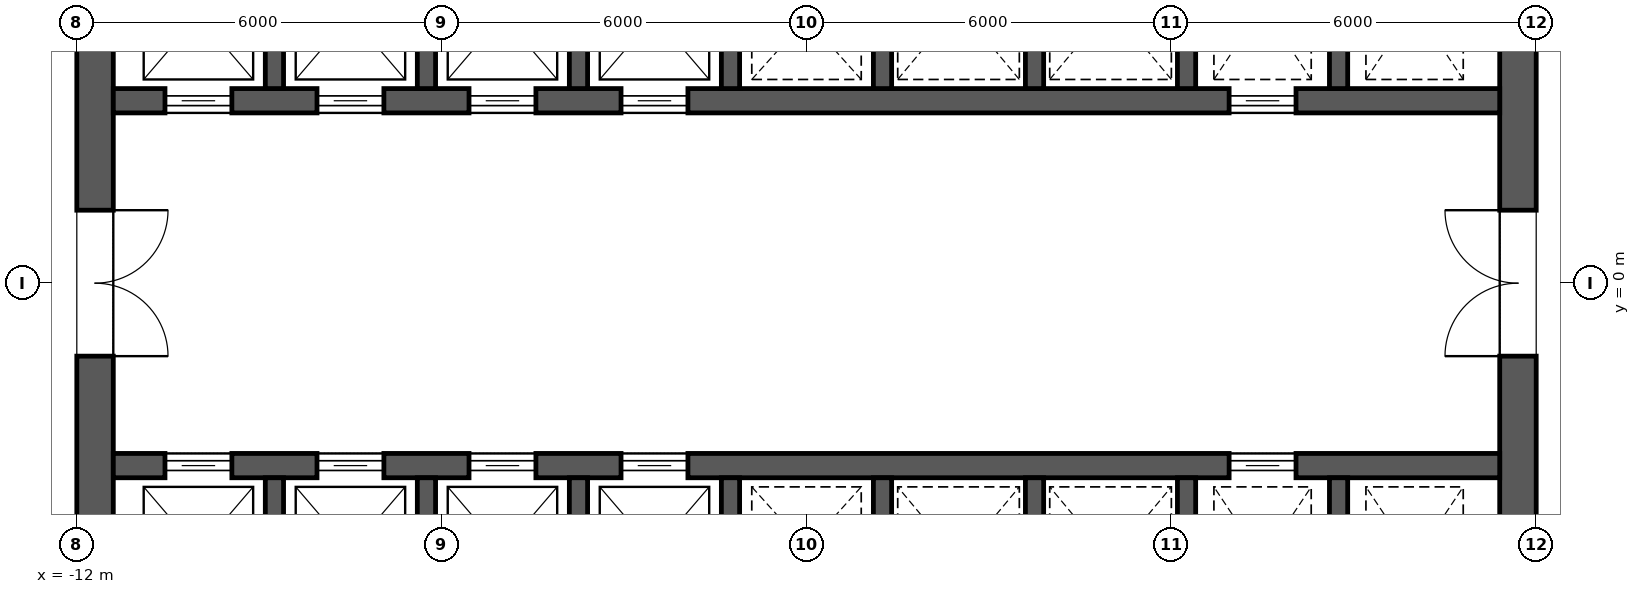
"""IFC4 building model, lengths in metres.
Left out: names, types, materials, properties, quantities, classifications, styles, units other than length and angle.
Written with IfcOpenShell. Run it as: python <this file> out.ifc"""

import sys

from ifc_helpers import new_model, si_unit, direction, frame, frame_2d, origin, place, context, subcontext, project, spatial, rectangle, extrude, element, fill, save


model = new_model("IFC4")
c1 = context("Model", 3, precision=1e-05, world=origin(), true_north=direction((0.0, 1.0)))
c2 = subcontext(c1, "Body", "Model", "MODEL_VIEW")
j1 = project(units=[si_unit("LENGTHUNIT", "METRE"), si_unit("PLANEANGLEUNIT", "RADIAN")], contexts=[c1])
p1 = place(None, origin())
s1 = spatial("IfcSite", under=j1, at=p1, CompositionType="ELEMENT")
p2 = place(p1, origin())
s2 = spatial("IfcBuilding", under=s1, at=p2, CompositionType="ELEMENT")
p3 = place(p2, frame((0.0, 0.0, 117.1)))
s3 = spatial("IfcBuildingStorey", under=s2, at=p3, CompositionType="ELEMENT", Elevation=117.1)
p4 = place(p3, frame((11.7, -11.4, 0.0), z_axis=(0.0, 0.0, 1.0), x_axis=(0.0, 1.0, 0.0)))
e1 = element("IfcWall", 1, at=p4, inside=s3, PredefinedType="SHEAR", context=c2, shape_type="SweptSolid", body=[
    extrude(rectangle(XDim=22.8, YDim=0.6, at=frame_2d((11.4, 0.0))), origin(), (0.0, 0.0, 1.0), 4.2),
])
p5 = place(p4, frame((10.2, 0.0, 0.0)))
e2 = element("IfcOpeningElement", 2, at=p5, cuts=e1, PredefinedType="OPENING", context=c2, shape_type="SweptSolid", body=[
    extrude(rectangle(XDim=2.4, YDim=2.1, at=frame_2d((1.2, 1.05))), frame((0.0, 0.312, 0.0), z_axis=(0.0, -1.0, 0.0), x_axis=(1.0, 0.0, 0.0)), (0.0, 0.0, 1.0), 0.624),
])
p6 = place(p4, frame((19.5, 0.0, 0.0)))
e3 = element("IfcOpeningElement", 3, at=p6, cuts=e1, PredefinedType="OPENING", context=c2, shape_type="SweptSolid", body=[
    extrude(rectangle(XDim=1.2, YDim=2.1, at=frame_2d((0.6, 1.05))), frame((0.0, 0.312, 0.0), z_axis=(0.0, -1.0, 0.0), x_axis=(1.0, 0.0, 0.0)), (0.0, 0.0, 1.0), 0.624),
])
p7 = place(p4, frame((2.1, 0.0, 0.0)))
e4 = element("IfcOpeningElement", 4, at=p7, cuts=e1, PredefinedType="OPENING", context=c2, shape_type="SweptSolid", body=[
    extrude(rectangle(XDim=1.2, YDim=2.1, at=frame_2d((0.6, 1.05))), frame((0.0, 0.312, 0.0), z_axis=(0.0, -1.0, 0.0), x_axis=(1.0, 0.0, 0.0)), (0.0, 0.0, 1.0), 0.624),
])
p8 = place(p3, frame((-11.7, -11.4, 0.0), z_axis=(0.0, 0.0, 1.0), x_axis=(0.0, 1.0, 0.0)))
e5 = element("IfcWall", 5, at=p8, inside=s3, PredefinedType="SHEAR", context=c2, shape_type="SweptSolid", body=[
    extrude(rectangle(XDim=22.8, YDim=0.6, at=frame_2d((11.4, 0.0))), origin(), (0.0, 0.0, 1.0), 4.2),
])
p9 = place(p8, frame((10.2, 0.0, 0.0)))
e6 = element("IfcOpeningElement", 6, at=p9, cuts=e5, PredefinedType="OPENING", context=c2, shape_type="SweptSolid", body=[
    extrude(rectangle(XDim=2.4, YDim=2.1, at=frame_2d((1.2, 1.05))), frame((0.0, 0.312, 0.0), z_axis=(0.0, -1.0, 0.0), x_axis=(1.0, 0.0, 0.0)), (0.0, 0.0, 1.0), 0.624),
])
p10 = place(p8, frame((18.925, 0.0, 0.0)))
e7 = element("IfcOpeningElement", 7, at=p10, cuts=e5, PredefinedType="OPENING", context=c2, shape_type="SweptSolid", body=[
    extrude(rectangle(XDim=1.2, YDim=2.1, at=frame_2d((0.6, 1.05))), frame((0.0, 0.312, 0.0), z_axis=(0.0, -1.0, 0.0), x_axis=(1.0, 0.0, 0.0)), (0.0, 0.0, 1.0), 0.624),
])
p11 = place(p8, frame((2.675, 0.0, 0.0)))
e8 = element("IfcOpeningElement", 8, at=p11, cuts=e5, PredefinedType="OPENING", context=c2, shape_type="SweptSolid", body=[
    extrude(rectangle(XDim=1.2, YDim=2.1, at=frame_2d((0.6, 1.05))), frame((0.0, 0.312, 0.0), z_axis=(0.0, -1.0, 0.0), x_axis=(1.0, 0.0, 0.0)), (0.0, 0.0, 1.0), 0.624),
])
p12 = place(p3, frame((-11.4, 3.0, 0.0), z_axis=(0.0, 0.0, 1.0), x_axis=(1.0, 0.0, 0.0)))
e9 = element("IfcWall", 9, at=p12, inside=s3, PredefinedType="SHEAR", context=c2, shape_type="SweptSolid", body=[
    extrude(rectangle(XDim=22.8, YDim=0.4, at=frame_2d((11.4, 0.0))), origin(), (0.0, 0.0, 1.0), 4.2),
])
p13 = place(p12, frame((0.85, 0.0, 0.0)))
e10 = element("IfcOpeningElement", 10, at=p13, cuts=e9, PredefinedType="OPENING", context=c2, shape_type="SweptSolid", body=[
    extrude(rectangle(XDim=1.1, YDim=2.1, at=frame_2d((0.55, 1.05))), frame((0.0, 0.212, 0.0), z_axis=(0.0, -1.0, 0.0), x_axis=(1.0, 0.0, 0.0)), (0.0, 0.0, 1.0), 0.424),
])
p14 = place(p12, frame((3.35, 0.0, 0.0)))
e11 = element("IfcOpeningElement", 11, at=p14, cuts=e9, PredefinedType="OPENING", context=c2, shape_type="SweptSolid", body=[
    extrude(rectangle(XDim=1.1, YDim=2.1, at=frame_2d((0.55, 1.05))), frame((0.0, 0.212, 0.0), z_axis=(0.0, -1.0, 0.0), x_axis=(1.0, 0.0, 0.0)), (0.0, 0.0, 1.0), 0.424),
])
p15 = place(p12, frame((5.85, 0.0, 0.0)))
e12 = element("IfcOpeningElement", 12, at=p15, cuts=e9, PredefinedType="OPENING", context=c2, shape_type="SweptSolid", body=[
    extrude(rectangle(XDim=1.1, YDim=2.1, at=frame_2d((0.55, 1.05))), frame((0.0, 0.212, 0.0), z_axis=(0.0, -1.0, 0.0), x_axis=(1.0, 0.0, 0.0)), (0.0, 0.0, 1.0), 0.424),
])
p16 = place(p12, frame((8.35, 0.0, 0.0)))
e13 = element("IfcOpeningElement", 13, at=p16, cuts=e9, PredefinedType="OPENING", context=c2, shape_type="SweptSolid", body=[
    extrude(rectangle(XDim=1.1, YDim=2.1, at=frame_2d((0.55, 1.05))), frame((0.0, 0.212, 0.0), z_axis=(0.0, -1.0, 0.0), x_axis=(1.0, 0.0, 0.0)), (0.0, 0.0, 1.0), 0.424),
])
p17 = place(p12, frame((18.35, 0.0, 0.0)))
e14 = element("IfcOpeningElement", 14, at=p17, cuts=e9, PredefinedType="OPENING", context=c2, shape_type="SweptSolid", body=[
    extrude(rectangle(XDim=1.1, YDim=2.1, at=frame_2d((0.55, 1.05))), frame((0.0, 0.212, 0.0), z_axis=(0.0, -1.0, 0.0), x_axis=(1.0, 0.0, 0.0)), (0.0, 0.0, 1.0), 0.424),
])
for number, where, z_axis, x_axis in (
    (15, (-8.75, 3.2, 0.0), (0.0, 0.0, 1.0), (0.0, 1.0, 0.0)),
    (16, (-6.25, 3.2, 0.0), (0.0, 0.0, 1.0), (0.0, 1.0, 0.0)),
    (17, (-3.75, 3.2, 0.0), (0.0, 0.0, 1.0), (0.0, 1.0, 0.0)),
    (18, (-1.25, 3.2, 0.0), (0.0, 0.0, 1.0), (0.0, 1.0, 0.0)),
    (19, (1.25, 3.2, 0.0), (0.0, 0.0, 1.0), (0.0, 1.0, 0.0)),
    (20, (3.75, 3.2, 0.0), (0.0, 0.0, 1.0), (0.0, 1.0, 0.0)),
    (21, (6.25, 3.2, 0.0), (0.0, 0.0, 1.0), (0.0, 1.0, 0.0)),
    (22, (8.75, 3.2, 0.0), (0.0, 0.0, 1.0), (0.0, 1.0, 0.0)),
):
    element("IfcWall", number, at=place(p3, frame(where, z_axis=z_axis, x_axis=x_axis)), inside=s3, PredefinedType="SHEAR", context=c2, shape_type="SweptSolid", body=[
        extrude(rectangle(XDim=2.9, YDim=0.3, at=frame_2d((1.45, 0.0))), origin(), (0.0, 0.0, 1.0), 4.2),
    ])
p18 = place(p3, frame((-11.4, -3.0, 0.0), z_axis=(0.0, 0.0, 1.0), x_axis=(1.0, 0.0, 0.0)))
e23 = element("IfcWall", 23, at=p18, inside=s3, PredefinedType="SHEAR", context=c2, shape_type="SweptSolid", body=[
    extrude(rectangle(XDim=22.8, YDim=0.4, at=frame_2d((11.4, 0.0))), origin(), (0.0, 0.0, 1.0), 4.2),
])
p19 = place(p18, frame((0.85, 0.0, 0.0)))
e24 = element("IfcOpeningElement", 24, at=p19, cuts=e23, PredefinedType="OPENING", context=c2, shape_type="SweptSolid", body=[
    extrude(rectangle(XDim=1.1, YDim=2.1, at=frame_2d((0.55, 1.05))), frame((0.0, 0.212, 0.0), z_axis=(0.0, -1.0, 0.0), x_axis=(1.0, 0.0, 0.0)), (0.0, 0.0, 1.0), 0.424),
])
p20 = place(p18, frame((3.35, 0.0, 0.0)))
e25 = element("IfcOpeningElement", 25, at=p20, cuts=e23, PredefinedType="OPENING", context=c2, shape_type="SweptSolid", body=[
    extrude(rectangle(XDim=1.1, YDim=2.1, at=frame_2d((0.55, 1.05))), frame((0.0, 0.212, 0.0), z_axis=(0.0, -1.0, 0.0), x_axis=(1.0, 0.0, 0.0)), (0.0, 0.0, 1.0), 0.424),
])
p21 = place(p18, frame((5.85, 0.0, 0.0)))
e26 = element("IfcOpeningElement", 26, at=p21, cuts=e23, PredefinedType="OPENING", context=c2, shape_type="SweptSolid", body=[
    extrude(rectangle(XDim=1.1, YDim=2.1, at=frame_2d((0.55, 1.05))), frame((0.0, 0.212, 0.0), z_axis=(0.0, -1.0, 0.0), x_axis=(1.0, 0.0, 0.0)), (0.0, 0.0, 1.0), 0.424),
])
p22 = place(p18, frame((8.35, 0.0, 0.0)))
e27 = element("IfcOpeningElement", 27, at=p22, cuts=e23, PredefinedType="OPENING", context=c2, shape_type="SweptSolid", body=[
    extrude(rectangle(XDim=1.1, YDim=2.1, at=frame_2d((0.55, 1.05))), frame((0.0, 0.212, 0.0), z_axis=(0.0, -1.0, 0.0), x_axis=(1.0, 0.0, 0.0)), (0.0, 0.0, 1.0), 0.424),
])
p23 = place(p18, frame((18.35, 0.0, 0.0)))
e28 = element("IfcOpeningElement", 28, at=p23, cuts=e23, PredefinedType="OPENING", context=c2, shape_type="SweptSolid", body=[
    extrude(rectangle(XDim=1.1, YDim=2.1, at=frame_2d((0.55, 1.05))), frame((0.0, 0.212, 0.0), z_axis=(0.0, -1.0, 0.0), x_axis=(1.0, 0.0, 0.0)), (0.0, 0.0, 1.0), 0.424),
])
for number, where, z_axis, x_axis in (
    (29, (-8.75, -6.1, 0.0), (0.0, 0.0, 1.0), (0.0, 1.0, 0.0)),
    (30, (-6.25, -6.1, 0.0), (0.0, 0.0, 1.0), (0.0, 1.0, 0.0)),
    (31, (-3.75, -6.1, 0.0), (0.0, 0.0, 1.0), (0.0, 1.0, 0.0)),
    (32, (-1.25, -6.1, 0.0), (0.0, 0.0, 1.0), (0.0, 1.0, 0.0)),
    (33, (1.25, -6.1, 0.0), (0.0, 0.0, 1.0), (0.0, 1.0, 0.0)),
    (34, (3.75, -6.1, 0.0), (0.0, 0.0, 1.0), (0.0, 1.0, 0.0)),
    (35, (6.25, -6.1, 0.0), (0.0, 0.0, 1.0), (0.0, 1.0, 0.0)),
    (36, (8.75, -6.1, 0.0), (0.0, 0.0, 1.0), (0.0, 1.0, 0.0)),
):
    element("IfcWall", number, at=place(p3, frame(where, z_axis=z_axis, x_axis=x_axis)), inside=s3, PredefinedType="SHEAR", context=c2, shape_type="SweptSolid", body=[
        extrude(rectangle(XDim=2.9, YDim=0.3, at=frame_2d((1.45, 0.0))), origin(), (0.0, 0.0, 1.0), 4.2),
    ])
p24 = place(p13, origin())
e37 = element("IfcDoor", 37, at=p24, inside=s3, OperationType="SLIDING_TO_LEFT", PredefinedType="DOOR", context=c2, shape_type="SweptSolid", body=[
    extrude(rectangle(XDim=1.1, YDim=2.1, at=frame_2d((0.55, 1.05))), frame((0.0, 0.025, 0.0), z_axis=(0.0, -1.0, 0.0), x_axis=(1.0, 0.0, 0.0)), (0.0, 0.0, 1.0), 0.05),
])
fill(e10, e37)
p25 = place(p14, origin())
e38 = element("IfcDoor", 38, at=p25, inside=s3, OperationType="SLIDING_TO_LEFT", PredefinedType="DOOR", context=c2, shape_type="SweptSolid", body=[
    extrude(rectangle(XDim=1.1, YDim=2.1, at=frame_2d((0.55, 1.05))), frame((0.0, 0.025, 0.0), z_axis=(0.0, -1.0, 0.0), x_axis=(1.0, 0.0, 0.0)), (0.0, 0.0, 1.0), 0.05),
])
fill(e11, e38)
p26 = place(p15, origin())
e39 = element("IfcDoor", 39, at=p26, inside=s3, OperationType="SLIDING_TO_LEFT", PredefinedType="DOOR", context=c2, shape_type="SweptSolid", body=[
    extrude(rectangle(XDim=1.1, YDim=2.1, at=frame_2d((0.55, 1.05))), frame((0.0, 0.025, 0.0), z_axis=(0.0, -1.0, 0.0), x_axis=(1.0, 0.0, 0.0)), (0.0, 0.0, 1.0), 0.05),
])
fill(e12, e39)
p27 = place(p16, origin())
e40 = element("IfcDoor", 40, at=p27, inside=s3, OperationType="SLIDING_TO_LEFT", PredefinedType="DOOR", context=c2, shape_type="SweptSolid", body=[
    extrude(rectangle(XDim=1.1, YDim=2.1, at=frame_2d((0.55, 1.05))), frame((0.0, 0.025, 0.0), z_axis=(0.0, -1.0, 0.0), x_axis=(1.0, 0.0, 0.0)), (0.0, 0.0, 1.0), 0.05),
])
fill(e13, e40)
p28 = place(p19, origin())
e41 = element("IfcDoor", 41, at=p28, inside=s3, OperationType="SLIDING_TO_LEFT", PredefinedType="DOOR", context=c2, shape_type="SweptSolid", body=[
    extrude(rectangle(XDim=1.1, YDim=2.1, at=frame_2d((0.55, 1.05))), frame((0.0, 0.025, 0.0), z_axis=(0.0, -1.0, 0.0), x_axis=(1.0, 0.0, 0.0)), (0.0, 0.0, 1.0), 0.05),
])
fill(e24, e41)
p29 = place(p20, origin())
e42 = element("IfcDoor", 42, at=p29, inside=s3, OperationType="SLIDING_TO_LEFT", PredefinedType="DOOR", context=c2, shape_type="SweptSolid", body=[
    extrude(rectangle(XDim=1.1, YDim=2.1, at=frame_2d((0.55, 1.05))), frame((0.0, 0.025, 0.0), z_axis=(0.0, -1.0, 0.0), x_axis=(1.0, 0.0, 0.0)), (0.0, 0.0, 1.0), 0.05),
])
fill(e25, e42)
p30 = place(p21, origin())
e43 = element("IfcDoor", 43, at=p30, inside=s3, OperationType="SLIDING_TO_LEFT", PredefinedType="DOOR", context=c2, shape_type="SweptSolid", body=[
    extrude(rectangle(XDim=1.1, YDim=2.1, at=frame_2d((0.55, 1.05))), frame((0.0, 0.025, 0.0), z_axis=(0.0, -1.0, 0.0), x_axis=(1.0, 0.0, 0.0)), (0.0, 0.0, 1.0), 0.05),
])
fill(e26, e43)
p31 = place(p22, origin())
e44 = element("IfcDoor", 44, at=p31, inside=s3, OperationType="SLIDING_TO_LEFT", PredefinedType="DOOR", context=c2, shape_type="SweptSolid", body=[
    extrude(rectangle(XDim=1.1, YDim=2.1, at=frame_2d((0.55, 1.05))), frame((0.0, 0.025, 0.0), z_axis=(0.0, -1.0, 0.0), x_axis=(1.0, 0.0, 0.0)), (0.0, 0.0, 1.0), 0.05),
])
fill(e27, e44)
p32 = place(p17, origin())
e45 = element("IfcDoor", 45, at=p32, inside=s3, OperationType="SLIDING_TO_LEFT", PredefinedType="DOOR", context=c2, shape_type="SweptSolid", body=[
    extrude(rectangle(XDim=1.1, YDim=2.1, at=frame_2d((0.55, 1.05))), frame((0.0, 0.025, 0.0), z_axis=(0.0, -1.0, 0.0), x_axis=(1.0, 0.0, 0.0)), (0.0, 0.0, 1.0), 0.05),
])
fill(e14, e45)
p33 = place(p23, origin())
e46 = element("IfcDoor", 46, at=p33, inside=s3, OperationType="SLIDING_TO_LEFT", PredefinedType="DOOR", context=c2, shape_type="SweptSolid", body=[
    extrude(rectangle(XDim=1.1, YDim=2.1, at=frame_2d((0.55, 1.05))), frame((0.0, 0.025, 0.0), z_axis=(0.0, -1.0, 0.0), x_axis=(1.0, 0.0, 0.0)), (0.0, 0.0, 1.0), 0.05),
])
fill(e28, e46)
p34 = place(p9, frame((2.4, 0.0, 0.0), z_axis=(0.0, 0.0, 1.0), x_axis=(-1.0, 0.0, 0.0)))
e47 = element("IfcDoor", 47, at=p34, inside=s3, OperationType="DOUBLE_DOOR_SINGLE_SWING", PredefinedType="DOOR", context=c2, shape_type="SweptSolid", body=[
    extrude(rectangle(XDim=2.4, YDim=2.1, at=frame_2d((1.2, 1.05))), frame((0.0, 0.025, 0.0), z_axis=(0.0, -1.0, 0.0), x_axis=(1.0, 0.0, 0.0)), (0.0, 0.0, 1.0), 0.05),
])
fill(e6, e47)
p35 = place(p5, origin())
e48 = element("IfcDoor", 48, at=p35, inside=s3, OperationType="DOUBLE_DOOR_SINGLE_SWING", PredefinedType="DOOR", context=c2, shape_type="SweptSolid", body=[
    extrude(rectangle(XDim=2.4, YDim=2.1, at=frame_2d((1.2, 1.05))), frame((0.0, 0.025, 0.0), z_axis=(0.0, -1.0, 0.0), x_axis=(1.0, 0.0, 0.0)), (0.0, 0.0, 1.0), 0.05),
])
fill(e2, e48)
save(model, sys.argv[1])
